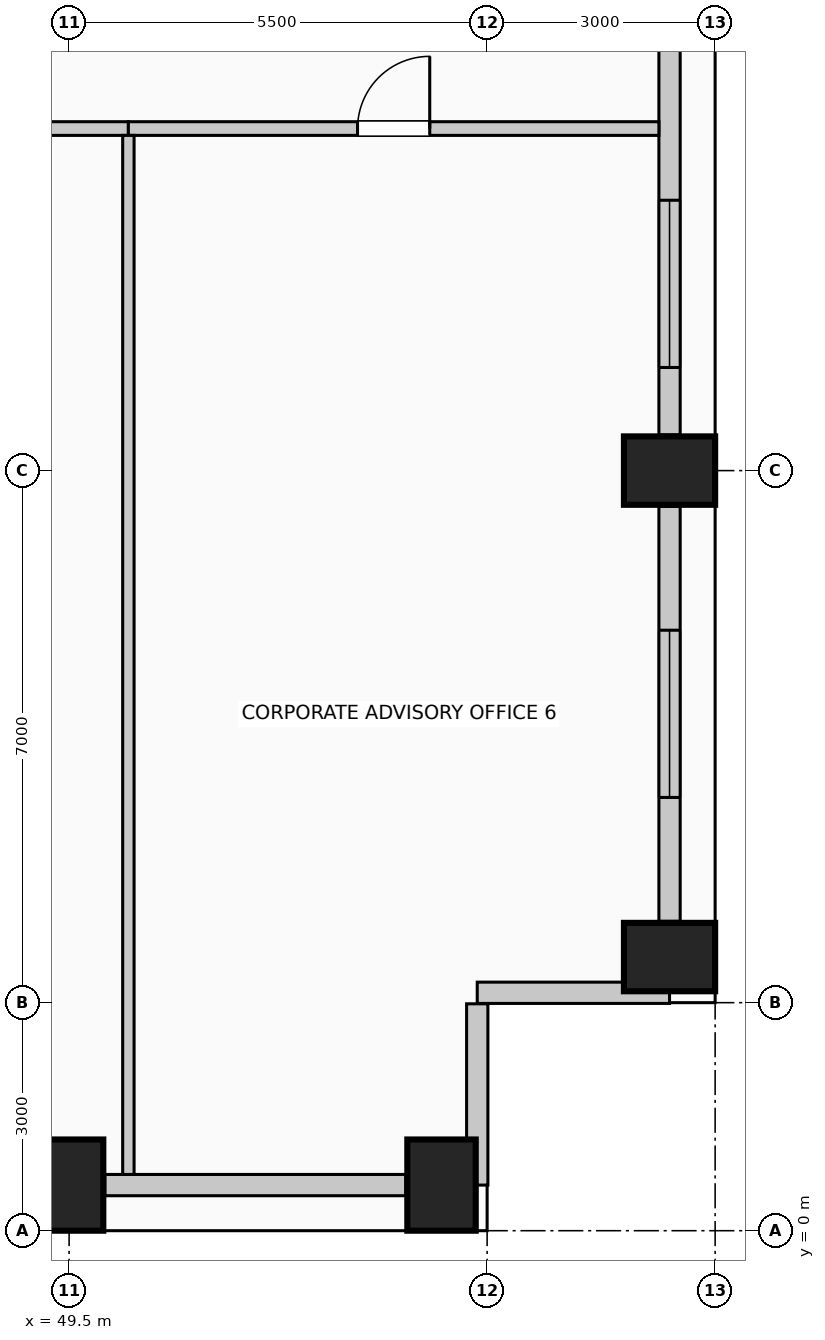
"""IFC4 building model, lengths in metres.
Left out: names, types, materials, properties, quantities, classifications, styles, units other than length and angle.
Written with IfcOpenShell. Run it as: python <this file> out.ifc"""

import sys

from ifc_helpers import new_model, si_unit, direction, frame, frame_2d, origin, origin_2d, place, context, subcontext, project, spatial, rectangle, extrude, element, fill, save


model = new_model("IFC4")
c1 = context("Model", 3, precision=1e-05, world=origin(), true_north=direction((0.0, 1.0)))
c2 = subcontext(c1, "Body", "Model", "MODEL_VIEW")
j1 = project(units=[si_unit("LENGTHUNIT", "METRE"), si_unit("PLANEANGLEUNIT", "RADIAN")], contexts=[c1])
p1 = place(None, origin())
s1 = spatial("IfcSite", under=j1, at=p1, CompositionType="ELEMENT")
p2 = place(p1, origin())
s2 = spatial("IfcBuilding", under=s1, at=p2, CompositionType="ELEMENT")
p3 = place(p2, frame((0.0, 0.0, 50.6)))
s3 = spatial("IfcBuildingStorey", under=s2, at=p3, CompositionType="ELEMENT", Elevation=50.6)
for number, where, z_axis, x_axis in (
    (1, (49.5, 0.6, 0.0), (0.0, 0.0, 1.0), (1.0, 0.0, 0.0)),
    (2, (54.4, 0.6, 0.0), (0.0, 0.0, 1.0), (1.0, 0.0, 0.0)),
    (3, (57.4, 3.6, 0.0), (0.0, 0.0, 1.0), (0.0, 1.0, 0.0)),
    (4, (57.4, 10.0, 0.0), (0.0, 0.0, 1.0), (0.0, 1.0, 0.0)),
):
    element("IfcColumn", number, at=place(p3, frame(where, z_axis=z_axis, x_axis=x_axis)), inside=s3, PredefinedType="COLUMN", context=c2, shape_type="SweptSolid", body=[
        extrude(rectangle(XDim=0.9, YDim=1.2, at=origin_2d()), origin(), (0.0, 0.0, 1.0), 4.0),
    ])
p4 = place(p3, frame((53.93, 0.6, 0.0), z_axis=(0.0, 0.0, 1.0), x_axis=(-1.0, 0.0, 0.0)))
e5 = element("IfcWall", 5, at=p4, inside=s3, PredefinedType="SOLIDWALL", context=c2, shape_type="SweptSolid", body=[
    extrude(rectangle(XDim=3.96, YDim=0.28, at=frame_2d((1.98, 0.0))), origin(), (0.0, 0.0, 1.0), 2.85),
])
p5 = place(p3, frame((57.4, 9.53, 0.0), z_axis=(0.0, 0.0, 1.0), x_axis=(0.0, -1.0, 0.0)))
e6 = element("IfcWall", 6, at=p5, inside=s3, PredefinedType="SOLIDWALL", context=c2, shape_type="SweptSolid", body=[
    extrude(rectangle(XDim=5.46, YDim=0.28, at=frame_2d((2.73, 0.0))), origin(), (0.0, 0.0, 1.0), 2.85),
])
p6 = place(p5, frame((1.63, 0.0, 0.5)))
e7 = element("IfcOpeningElement", 7, at=p6, cuts=e6, PredefinedType="OPENING", context=c2, shape_type="SweptSolid", body=[
    extrude(rectangle(XDim=2.2, YDim=1.95, at=frame_2d((1.1, 0.975))), frame((0.0, 0.15, 0.0), z_axis=(0.0, -1.0, 0.0), x_axis=(1.0, 0.0, 0.0)), (0.0, 0.0, 1.0), 0.3),
])
p7 = place(p3, frame((57.4, 17.53, 0.0), z_axis=(0.0, 0.0, 1.0), x_axis=(0.0, -1.0, 0.0)))
e8 = element("IfcWall", 8, at=p7, inside=s3, PredefinedType="SOLIDWALL", context=c2, shape_type="SweptSolid", body=[
    extrude(rectangle(XDim=7.06, YDim=0.28, at=frame_2d((3.53, 0.0))), origin(), (0.0, 0.0, 1.0), 2.85),
])
p8 = place(p7, frame((3.973, 0.0, 0.5)))
e9 = element("IfcOpeningElement", 9, at=p8, cuts=e8, PredefinedType="OPENING", context=c2, shape_type="SweptSolid", body=[
    extrude(rectangle(XDim=2.2, YDim=1.95, at=frame_2d((1.1, 0.975))), frame((0.0, 0.15, 0.0), z_axis=(0.0, -1.0, 0.0), x_axis=(1.0, 0.0, 0.0)), (0.0, 0.0, 1.0), 0.3),
])
p9 = place(p3, frame((57.4, 3.13, 0.0), z_axis=(0.0, 0.0, 1.0), x_axis=(-1.0, 0.0, 0.0)))
e10 = element("IfcWall", 10, at=p9, inside=s3, PredefinedType="SOLIDWALL", context=c2, shape_type="SweptSolid", body=[
    extrude(rectangle(XDim=2.53, YDim=0.28, at=frame_2d((1.265, 0.0))), origin(), (0.0, 0.0, 1.0), 3.7),
])
p10 = place(p3, frame((54.87, 2.985, 0.0), z_axis=(0.0, 0.0, 1.0), x_axis=(0.0, -1.0, 0.0)))
e11 = element("IfcWall", 11, at=p10, inside=s3, PredefinedType="SOLIDWALL", context=c2, shape_type="SweptSolid", body=[
    extrude(rectangle(XDim=2.385, YDim=0.28, at=frame_2d((1.192, 0.0))), origin(), (0.0, 0.0, 1.0), 3.7),
])
p11 = place(p3, frame((41.6, 14.5, 0.0), z_axis=(0.0, 0.0, 1.0), x_axis=(1.0, 0.0, 0.0)))
e12 = element("IfcWall", 12, at=p11, inside=s3, PredefinedType="PARTITIONING", context=c2, shape_type="SweptSolid", body=[
    extrude(rectangle(XDim=8.68, YDim=0.18, at=frame_2d((4.34, 0.0))), origin(), (0.0, 0.0, 1.0), 3.7),
])
p12 = place(p11, frame((3.815, 0.0, 0.0)))
e13 = element("IfcOpeningElement", 13, at=p12, cuts=e12, PredefinedType="OPENING", context=c2, shape_type="SweptSolid", body=[
    extrude(rectangle(XDim=1.05, YDim=2.15, at=frame_2d((0.525, 1.075))), frame((0.0, 0.1, 0.0), z_axis=(0.0, -1.0, 0.0), x_axis=(1.0, 0.0, 0.0)), (0.0, 0.0, 1.0), 0.2),
])
p13 = place(p3, frame((50.28, 14.5, 0.0), z_axis=(0.0, 0.0, 1.0), x_axis=(1.0, 0.0, 0.0)))
e14 = element("IfcWall", 14, at=p13, inside=s3, PredefinedType="PARTITIONING", context=c2, shape_type="SweptSolid", body=[
    extrude(rectangle(XDim=6.98, YDim=0.18, at=frame_2d((3.49, 0.0))), origin(), (0.0, 0.0, 1.0), 3.7),
])
p14 = place(p13, frame((3.015, 0.0, 0.0)))
e15 = element("IfcOpeningElement", 15, at=p14, cuts=e14, PredefinedType="OPENING", context=c2, shape_type="SweptSolid", body=[
    extrude(rectangle(XDim=0.95, YDim=2.15, at=frame_2d((0.475, 1.075))), frame((0.0, 0.1, 0.0), z_axis=(0.0, -1.0, 0.0), x_axis=(1.0, 0.0, 0.0)), (0.0, 0.0, 1.0), 0.2),
])
p15 = place(p3, frame((50.28, 0.74, 0.0), z_axis=(0.0, 0.0, 1.0), x_axis=(0.0, 1.0, 0.0)))
e16 = element("IfcWall", 16, at=p15, inside=s3, PredefinedType="PARTITIONING", context=c2, shape_type="SweptSolid", body=[
    extrude(rectangle(XDim=13.67, YDim=0.15, at=frame_2d((6.835, 0.0))), origin(), (0.0, 0.0, 1.0), 3.7),
])
p16 = place(p6, origin())
e17 = element("IfcWindow", 17, at=p16, inside=s3, PartitioningType="SINGLE_PANEL", PredefinedType="WINDOW", context=c2, shape_type="SweptSolid", body=[
    extrude(rectangle(XDim=2.2, YDim=1.95, at=frame_2d((1.1, 0.975))), frame((0.0, 0.03, 0.0), z_axis=(0.0, -1.0, 0.0), x_axis=(1.0, 0.0, 0.0)), (0.0, 0.0, 1.0), 0.06),
])
fill(e7, e17)
p17 = place(p8, origin())
e18 = element("IfcWindow", 18, at=p17, inside=s3, PartitioningType="SINGLE_PANEL", PredefinedType="WINDOW", context=c2, shape_type="SweptSolid", body=[
    extrude(rectangle(XDim=2.2, YDim=1.95, at=frame_2d((1.1, 0.975))), frame((0.0, 0.03, 0.0), z_axis=(0.0, -1.0, 0.0), x_axis=(1.0, 0.0, 0.0)), (0.0, 0.0, 1.0), 0.06),
])
fill(e9, e18)
p18 = place(p14, origin())
e19 = element("IfcDoor", 19, at=p18, inside=s3, OperationType="SINGLE_SWING_RIGHT", PredefinedType="DOOR", context=c2, shape_type="SweptSolid", body=[
    extrude(rectangle(XDim=0.95, YDim=2.15, at=frame_2d((0.475, 1.075))), frame((0.0, 0.025, 0.0), z_axis=(0.0, -1.0, 0.0), x_axis=(1.0, 0.0, 0.0)), (0.0, 0.0, 1.0), 0.05),
])
fill(e15, e19)
save(model, sys.argv[1])
